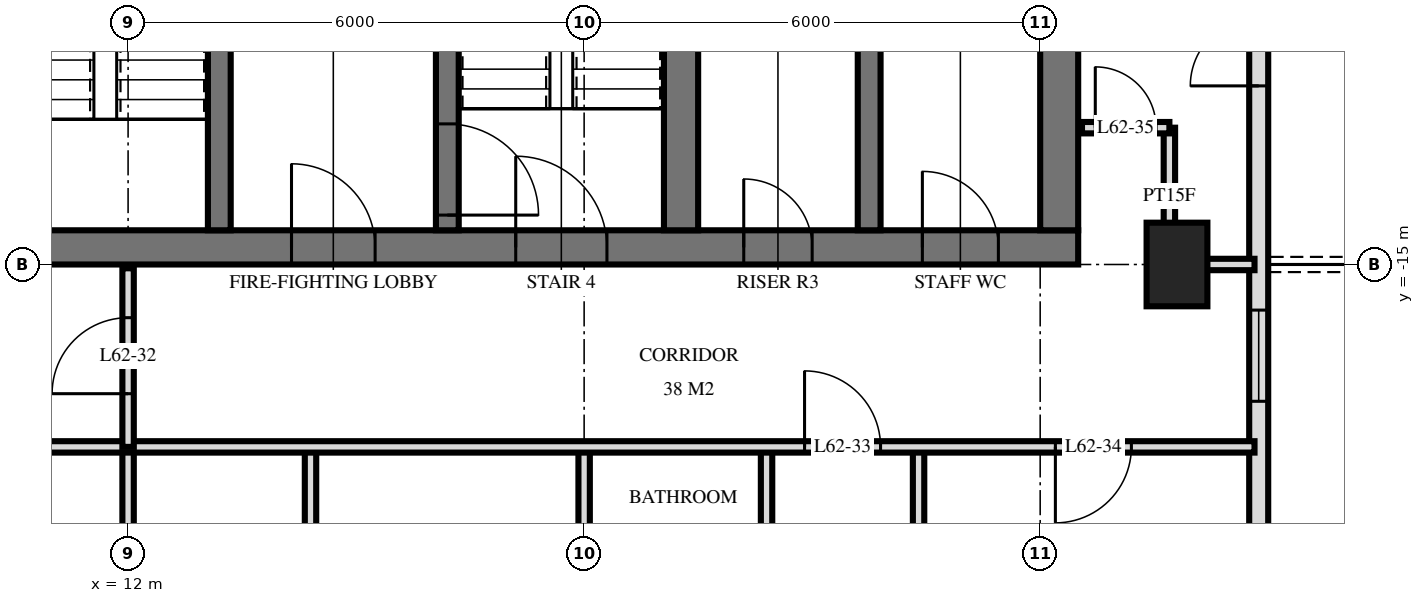
"""IFC4 building model, lengths in metres.
Left out: names, types, materials, properties, quantities, classifications, styles, units other than length and angle.
Written with IfcOpenShell. Run it as: python <this file> out.ifc"""

import sys

from ifc_helpers import new_model, si_unit, direction, frame, frame_2d, origin, origin_2d, place, context, subcontext, project, spatial, rectangle, extrude, element, fill, save


model = new_model("IFC4")
c1 = context("Model", 3, precision=1e-05, world=origin(), true_north=direction((0.0, 1.0)))
c2 = subcontext(c1, "Body", "Model", "MODEL_VIEW")
j1 = project(units=[si_unit("LENGTHUNIT", "METRE"), si_unit("PLANEANGLEUNIT", "RADIAN")], contexts=[c1])
p1 = place(None, origin())
s1 = spatial("IfcSite", under=j1, at=p1, CompositionType="ELEMENT")
p2 = place(p1, origin())
s2 = spatial("IfcBuilding", under=s1, at=p2, CompositionType="ELEMENT")
p3 = place(p2, frame((0.0, 0.0, 236.1)))
s3 = spatial("IfcBuildingStorey", under=s2, at=p3, CompositionType="ELEMENT", Elevation=236.1)
p4 = place(p3, frame((25.8, -15.0, 0.0), z_axis=(0.0, 0.0, 1.0), x_axis=(0.0, 1.0, 0.0)))
e1 = element("IfcColumn", 1, at=p4, inside=s3, PredefinedType="COLUMN", context=c2, shape_type="SweptSolid", body=[
    extrude(rectangle(XDim=1.1, YDim=0.8, at=origin_2d()), origin(), (0.0, 0.0, 1.0), 3.5),
])
p5 = place(p3, frame((10.0, -14.775, 0.0), z_axis=(0.0, 0.0, 1.0), x_axis=(1.0, 0.0, 0.0)))
e2 = element("IfcWall", 2, at=p5, inside=s3, PredefinedType="SHEAR", context=c2, shape_type="SweptSolid", body=[
    extrude(rectangle(XDim=14.5, YDim=0.45, at=frame_2d((7.25, 0.0))), origin(), (0.0, 0.0, 1.0), 3.5),
])
p6 = place(p5, frame((7.1, 0.0, 0.0)))
e3 = element("IfcOpeningElement", 3, at=p6, cuts=e2, PredefinedType="OPENING", context=c2, shape_type="SweptSolid", body=[
    extrude(rectangle(XDim=1.2, YDim=2.1, at=frame_2d((0.6, 1.05))), frame((0.0, 0.235, 0.0), z_axis=(0.0, -1.0, 0.0), x_axis=(1.0, 0.0, 0.0)), (0.0, 0.0, 1.0), 0.47),
])
p7 = place(p5, frame((4.15, 0.0, 0.0)))
e4 = element("IfcOpeningElement", 4, at=p7, cuts=e2, PredefinedType="OPENING", context=c2, shape_type="SweptSolid", body=[
    extrude(rectangle(XDim=1.1, YDim=2.1, at=frame_2d((0.55, 1.05))), frame((0.0, 0.235, 0.0), z_axis=(0.0, -1.0, 0.0), x_axis=(1.0, 0.0, 0.0)), (0.0, 0.0, 1.0), 0.47),
])
p8 = place(p5, frame((10.1, 0.0, 0.0)))
e5 = element("IfcOpeningElement", 5, at=p8, cuts=e2, PredefinedType="OPENING", context=c2, shape_type="SweptSolid", body=[
    extrude(rectangle(XDim=0.9, YDim=2.1, at=frame_2d((0.45, 1.05))), frame((0.0, 0.235, 0.0), z_axis=(0.0, -1.0, 0.0), x_axis=(1.0, 0.0, 0.0)), (0.0, 0.0, 1.0), 0.47),
])
p9 = place(p5, frame((12.45, 0.0, 0.0)))
e6 = element("IfcOpeningElement", 6, at=p9, cuts=e2, PredefinedType="OPENING", context=c2, shape_type="SweptSolid", body=[
    extrude(rectangle(XDim=1.0, YDim=2.1, at=frame_2d((0.5, 1.05))), frame((0.0, 0.235, 0.0), z_axis=(0.0, -1.0, 0.0), x_axis=(1.0, 0.0, 0.0)), (0.0, 0.0, 1.0), 0.47),
])
p10 = place(p3, frame((24.25, -14.55, 0.0), z_axis=(0.0, 0.0, 1.0), x_axis=(0.0, 1.0, 0.0)))
e7 = element("IfcWall", 7, at=p10, inside=s3, PredefinedType="SHEAR", context=c2, shape_type="SweptSolid", body=[
    extrude(rectangle(XDim=14.1, YDim=0.5, at=frame_2d((7.05, 0.0))), origin(), (0.0, 0.0, 1.0), 3.5),
])
p11 = place(p3, frame((13.2, -14.55, 0.0), z_axis=(0.0, 0.0, 1.0), x_axis=(0.0, 1.0, 0.0)))
e8 = element("IfcWall", 8, at=p11, inside=s3, PredefinedType="SHEAR", context=c2, shape_type="SweptSolid", body=[
    extrude(rectangle(XDim=5.4, YDim=0.3, at=frame_2d((2.7, 0.0))), origin(), (0.0, 0.0, 1.0), 3.5),
])
p12 = place(p11, frame((4.0, 0.0, 0.0)))
e9 = element("IfcOpeningElement", 9, at=p12, cuts=e8, PredefinedType="OPENING", context=c2, shape_type="SweptSolid", body=[
    extrude(rectangle(XDim=1.2, YDim=2.1, at=frame_2d((0.6, 1.05))), frame((0.0, 0.16, 0.0), z_axis=(0.0, -1.0, 0.0), x_axis=(1.0, 0.0, 0.0)), (0.0, 0.0, 1.0), 0.32),
])
p13 = place(p3, frame((16.2, -14.55, 0.0), z_axis=(0.0, 0.0, 1.0), x_axis=(0.0, 1.0, 0.0)))
e10 = element("IfcWall", 10, at=p13, inside=s3, PredefinedType="SHEAR", context=c2, shape_type="SweptSolid", body=[
    extrude(rectangle(XDim=5.4, YDim=0.3, at=frame_2d((2.7, 0.0))), origin(), (0.0, 0.0, 1.0), 3.5),
])
p14 = place(p13, frame((0.2, 0.0, 0.0)))
e11 = element("IfcOpeningElement", 11, at=p14, cuts=e10, PredefinedType="OPENING", context=c2, shape_type="SweptSolid", body=[
    extrude(rectangle(XDim=1.2, YDim=2.1, at=frame_2d((0.6, 1.05))), frame((0.0, 0.16, 0.0), z_axis=(0.0, -1.0, 0.0), x_axis=(1.0, 0.0, 0.0)), (0.0, 0.0, 1.0), 0.32),
])
p15 = place(p3, frame((19.275, -14.55, 0.0), z_axis=(0.0, 0.0, 1.0), x_axis=(0.0, 1.0, 0.0)))
e12 = element("IfcWall", 12, at=p15, inside=s3, PredefinedType="SHEAR", context=c2, shape_type="SweptSolid", body=[
    extrude(rectangle(XDim=5.4, YDim=0.45, at=frame_2d((2.7, 0.0))), origin(), (0.0, 0.0, 1.0), 3.5),
])
p16 = place(p3, frame((21.75, -14.55, 0.0), z_axis=(0.0, 0.0, 1.0), x_axis=(0.0, 1.0, 0.0)))
e13 = element("IfcWall", 13, at=p16, inside=s3, PredefinedType="SHEAR", context=c2, shape_type="SweptSolid", body=[
    extrude(rectangle(XDim=5.4, YDim=0.3, at=frame_2d((2.7, 0.0))), origin(), (0.0, 0.0, 1.0), 3.5),
])
p17 = place(p3, frame((26.875, -24.875, 0.0), z_axis=(0.0, 0.0, 1.0), x_axis=(0.0, 1.0, 0.0)))
e14 = element("IfcWall", 14, at=p17, inside=s3, PredefinedType="SOLIDWALL", context=c2, shape_type="SweptSolid", body=[
    extrude(rectangle(XDim=21.551, YDim=0.25, at=frame_2d((10.775, 0.0))), origin(), (0.0, 0.0, 1.0), 3.22),
])
p18 = place(p17, frame((0.575, 0.0, 0.0)))
e15 = element("IfcOpeningElement", 15, at=p18, cuts=e14, PredefinedType="OPENING", context=c2, shape_type="SweptSolid", body=[
    extrude(rectangle(XDim=1.8, YDim=2.4, at=frame_2d((0.9, 1.2))), frame((0.0, 0.135, 0.0), z_axis=(0.0, -1.0, 0.0), x_axis=(1.0, 0.0, 0.0)), (0.0, 0.0, 1.0), 0.27),
])
p19 = place(p17, frame((4.475, 0.0, 0.0)))
e16 = element("IfcOpeningElement", 16, at=p19, cuts=e14, PredefinedType="OPENING", context=c2, shape_type="SweptSolid", body=[
    extrude(rectangle(XDim=1.8, YDim=2.4, at=frame_2d((0.9, 1.2))), frame((0.0, 0.135, 0.0), z_axis=(0.0, -1.0, 0.0), x_axis=(1.0, 0.0, 0.0)), (0.0, 0.0, 1.0), 0.27),
])
p20 = place(p17, frame((8.075, 0.0, 0.9)))
e17 = element("IfcOpeningElement", 17, at=p20, cuts=e14, PredefinedType="OPENING", context=c2, shape_type="SweptSolid", body=[
    extrude(rectangle(XDim=1.2, YDim=1.5, at=frame_2d((0.6, 0.75))), frame((0.0, 0.135, 0.0), z_axis=(0.0, -1.0, 0.0), x_axis=(1.0, 0.0, 0.0)), (0.0, 0.0, 1.0), 0.27),
])
p21 = place(p17, frame((12.225, 0.0, 0.0)))
e18 = element("IfcOpeningElement", 18, at=p21, cuts=e14, PredefinedType="OPENING", context=c2, shape_type="SweptSolid", body=[
    extrude(rectangle(XDim=1.8, YDim=2.4, at=frame_2d((0.9, 1.2))), frame((0.0, 0.135, 0.0), z_axis=(0.0, -1.0, 0.0), x_axis=(1.0, 0.0, 0.0)), (0.0, 0.0, 1.0), 0.27),
])
p22 = place(p3, frame((25.7, -15.0, 0.0), z_axis=(0.0, 0.0, 1.0), x_axis=(0.0, 1.0, 0.0)))
e19 = element("IfcWall", 19, at=p22, inside=s3, PredefinedType="PARTITIONING", context=c2, shape_type="SweptSolid", body=[
    extrude(rectangle(XDim=1.8, YDim=0.15, at=frame_2d((0.9, 0.0))), origin(), (0.0, 0.0, 1.0), 3.22),
])
p23 = place(p3, frame((22.4, -21.6, 0.0), z_axis=(0.0, 0.0, 1.0), x_axis=(0.0, 1.0, 0.0)))
e20 = element("IfcWall", 20, at=p23, inside=s3, PredefinedType="PARTITIONING", context=c2, shape_type="SweptSolid", body=[
    extrude(rectangle(XDim=4.2, YDim=0.15, at=frame_2d((2.1, 0.0))), origin(), (0.0, 0.0, 1.0), 3.22),
])
p24 = place(p3, frame((20.4, -21.6, 0.0), z_axis=(0.0, 0.0, 1.0), x_axis=(0.0, 1.0, 0.0)))
e21 = element("IfcWall", 21, at=p24, inside=s3, PredefinedType="PARTITIONING", context=c2, shape_type="SweptSolid", body=[
    extrude(rectangle(XDim=4.2, YDim=0.15, at=frame_2d((2.1, 0.0))), origin(), (0.0, 0.0, 1.0), 3.22),
])
p25 = place(p24, frame((1.6, 0.0, 0.0)))
e22 = element("IfcOpeningElement", 22, at=p25, cuts=e21, PredefinedType="OPENING", context=c2, shape_type="SweptSolid", body=[
    extrude(rectangle(XDim=1.0, YDim=2.1, at=frame_2d((0.5, 1.05))), frame((0.0, 0.085, 0.0), z_axis=(0.0, -1.0, 0.0), x_axis=(1.0, 0.0, 0.0)), (0.0, 0.0, 1.0), 0.17),
])
for number, where, z_axis, x_axis in (
    (23, (18.0, -21.6, 0.0), (0.0, 0.0, 1.0), (0.0, 1.0, 0.0)),
    (24, (14.4, -21.6, 0.0), (0.0, 0.0, 1.0), (0.0, 1.0, 0.0)),
):
    element("IfcWall", number, at=place(p3, frame(where, z_axis=z_axis, x_axis=x_axis)), inside=s3, PredefinedType="PARTITIONING", context=c2, shape_type="SweptSolid", body=[
        extrude(rectangle(XDim=4.2, YDim=0.15, at=frame_2d((2.1, 0.0))), origin(), (0.0, 0.0, 1.0), 3.22),
    ])
p26 = place(p3, frame((12.0, -17.4, 0.0), z_axis=(0.0, 0.0, 1.0), x_axis=(0.0, 1.0, 0.0)))
e25 = element("IfcWall", 25, at=p26, inside=s3, PredefinedType="PARTITIONING", context=c2, shape_type="SweptSolid", body=[
    extrude(rectangle(XDim=2.35, YDim=0.15, at=frame_2d((1.175, 0.0))), origin(), (0.0, 0.0, 1.0), 3.22),
])
p27 = place(p26, frame((0.7, 0.0, 0.0)))
e26 = element("IfcOpeningElement", 26, at=p27, cuts=e25, PredefinedType="OPENING", context=c2, shape_type="SweptSolid", body=[
    extrude(rectangle(XDim=1.0, YDim=2.1, at=frame_2d((0.5, 1.05))), frame((0.0, 0.085, 0.0), z_axis=(0.0, -1.0, 0.0), x_axis=(1.0, 0.0, 0.0)), (0.0, 0.0, 1.0), 0.17),
])
p28 = place(p3, frame((12.0, -29.22, 0.0), z_axis=(0.0, 0.0, 1.0), x_axis=(0.0, 1.0, 0.0)))
e27 = element("IfcWall", 27, at=p28, inside=s3, PredefinedType="PARTITIONING", context=c2, shape_type="SweptSolid", body=[
    extrude(rectangle(XDim=11.82, YDim=0.15, at=frame_2d((5.91, 0.0))), origin(), (0.0, 0.0, 1.0), 3.22),
])
p29 = place(p3, frame((-26.82, -17.4, 0.0), z_axis=(0.0, 0.0, 1.0), x_axis=(1.0, 0.0, 0.0)))
e28 = element("IfcWall", 28, at=p29, inside=s3, PredefinedType="PARTITIONING", context=c2, shape_type="SweptSolid", body=[
    extrude(rectangle(XDim=53.64, YDim=0.15, at=frame_2d((26.82, 0.0))), origin(), (0.0, 0.0, 1.0), 3.22),
])
p30 = place(p29, frame((11.97, 0.0, 0.0)))
e29 = element("IfcOpeningElement", 29, at=p30, cuts=e28, PredefinedType="OPENING", context=c2, shape_type="SweptSolid", body=[
    extrude(rectangle(XDim=1.0, YDim=2.1, at=frame_2d((0.5, 1.05))), frame((0.0, 0.085, 0.0), z_axis=(0.0, -1.0, 0.0), x_axis=(1.0, 0.0, 0.0)), (0.0, 0.0, 1.0), 0.17),
])
p31 = place(p29, frame((3.92, 0.0, 0.0)))
e30 = element("IfcOpeningElement", 30, at=p31, cuts=e28, PredefinedType="OPENING", context=c2, shape_type="SweptSolid", body=[
    extrude(rectangle(XDim=1.0, YDim=2.1, at=frame_2d((0.5, 1.05))), frame((0.0, 0.085, 0.0), z_axis=(0.0, -1.0, 0.0), x_axis=(1.0, 0.0, 0.0)), (0.0, 0.0, 1.0), 0.17),
])
p32 = place(p29, frame((5.72, 0.0, 0.0)))
e31 = element("IfcOpeningElement", 31, at=p32, cuts=e28, PredefinedType="OPENING", context=c2, shape_type="SweptSolid", body=[
    extrude(rectangle(XDim=1.0, YDim=2.1, at=frame_2d((0.5, 1.05))), frame((0.0, 0.085, 0.0), z_axis=(0.0, -1.0, 0.0), x_axis=(1.0, 0.0, 0.0)), (0.0, 0.0, 1.0), 0.17),
])
p33 = place(p29, frame((47.72, 0.0, 0.0)))
e32 = element("IfcOpeningElement", 32, at=p33, cuts=e28, PredefinedType="OPENING", context=c2, shape_type="SweptSolid", body=[
    extrude(rectangle(XDim=1.0, YDim=2.1, at=frame_2d((0.5, 1.05))), frame((0.0, 0.085, 0.0), z_axis=(0.0, -1.0, 0.0), x_axis=(1.0, 0.0, 0.0)), (0.0, 0.0, 1.0), 0.17),
])
p34 = place(p29, frame((51.02, 0.0, 0.0)))
e33 = element("IfcOpeningElement", 33, at=p34, cuts=e28, PredefinedType="OPENING", context=c2, shape_type="SweptSolid", body=[
    extrude(rectangle(XDim=1.0, YDim=2.1, at=frame_2d((0.5, 1.05))), frame((0.0, 0.085, 0.0), z_axis=(0.0, -1.0, 0.0), x_axis=(1.0, 0.0, 0.0)), (0.0, 0.0, 1.0), 0.17),
])
p35 = place(p29, frame((17.32, 0.0, 0.0)))
e34 = element("IfcOpeningElement", 34, at=p35, cuts=e28, PredefinedType="OPENING", context=c2, shape_type="SweptSolid", body=[
    extrude(rectangle(XDim=1.0, YDim=2.1, at=frame_2d((0.5, 1.05))), frame((0.0, 0.085, 0.0), z_axis=(0.0, -1.0, 0.0), x_axis=(1.0, 0.0, 0.0)), (0.0, 0.0, 1.0), 0.17),
])
p36 = place(p29, frame((23.32, 0.0, 0.0)))
e35 = element("IfcOpeningElement", 35, at=p36, cuts=e28, PredefinedType="OPENING", context=c2, shape_type="SweptSolid", body=[
    extrude(rectangle(XDim=1.0, YDim=2.1, at=frame_2d((0.5, 1.05))), frame((0.0, 0.085, 0.0), z_axis=(0.0, -1.0, 0.0), x_axis=(1.0, 0.0, 0.0)), (0.0, 0.0, 1.0), 0.17),
])
p37 = place(p29, frame((29.32, 0.0, 0.0)))
e36 = element("IfcOpeningElement", 36, at=p37, cuts=e28, PredefinedType="OPENING", context=c2, shape_type="SweptSolid", body=[
    extrude(rectangle(XDim=1.0, YDim=2.1, at=frame_2d((0.5, 1.05))), frame((0.0, 0.085, 0.0), z_axis=(0.0, -1.0, 0.0), x_axis=(1.0, 0.0, 0.0)), (0.0, 0.0, 1.0), 0.17),
])
p38 = place(p29, frame((35.32, 0.0, 0.0)))
e37 = element("IfcOpeningElement", 37, at=p38, cuts=e28, PredefinedType="OPENING", context=c2, shape_type="SweptSolid", body=[
    extrude(rectangle(XDim=1.0, YDim=2.1, at=frame_2d((0.5, 1.05))), frame((0.0, 0.085, 0.0), z_axis=(0.0, -1.0, 0.0), x_axis=(1.0, 0.0, 0.0)), (0.0, 0.0, 1.0), 0.17),
])
p39 = place(p3, frame((25.7, -15.0, 0.0), z_axis=(0.0, 0.0, 1.0), x_axis=(1.0, 0.0, 0.0)))
e38 = element("IfcWall", 38, at=p39, inside=s3, PredefinedType="PARTITIONING", context=c2, shape_type="SweptSolid", body=[
    extrude(rectangle(XDim=1.12, YDim=0.15, at=frame_2d((0.56, 0.0))), origin(), (0.0, 0.0, 1.0), 3.22),
])
p40 = place(p3, frame((24.55, -13.2, 0.0), z_axis=(0.0, 0.0, 1.0), x_axis=(1.0, 0.0, 0.0)))
e39 = element("IfcWall", 39, at=p40, inside=s3, PredefinedType="PARTITIONING", context=c2, shape_type="SweptSolid", body=[
    extrude(rectangle(XDim=1.15, YDim=0.15, at=frame_2d((0.575, 0.0))), origin(), (0.0, 0.0, 1.0), 3.22),
])
p41 = place(p40, frame((0.175, 0.0, 0.0)))
e40 = element("IfcOpeningElement", 40, at=p41, cuts=e39, PredefinedType="OPENING", context=c2, shape_type="SweptSolid", body=[
    extrude(rectangle(XDim=0.8, YDim=2.1, at=frame_2d((0.4, 1.05))), frame((0.0, 0.085, 0.0), z_axis=(0.0, -1.0, 0.0), x_axis=(1.0, 0.0, 0.0)), (0.0, 0.0, 1.0), 0.17),
])
p42 = place(p20, origin())
e41 = element("IfcWindow", 41, at=p42, inside=s3, PartitioningType="SINGLE_PANEL", PredefinedType="WINDOW", context=c2, shape_type="SweptSolid", body=[
    extrude(rectangle(XDim=1.2, YDim=1.5, at=frame_2d((0.6, 0.75))), frame((0.0, 0.03, 0.0), z_axis=(0.0, -1.0, 0.0), x_axis=(1.0, 0.0, 0.0)), (0.0, 0.0, 1.0), 0.06),
])
fill(e17, e41)
p43 = place(p21, origin())
e42 = element("IfcDoor", 42, at=p43, inside=s3, OperationType="DOUBLE_DOOR_SINGLE_SWING", PredefinedType="DOOR", context=c2, shape_type="SweptSolid", body=[
    extrude(rectangle(XDim=1.8, YDim=2.4, at=frame_2d((0.9, 1.2))), frame((0.0, 0.025, 0.0), z_axis=(0.0, -1.0, 0.0), x_axis=(1.0, 0.0, 0.0)), (0.0, 0.0, 1.0), 0.05),
])
fill(e18, e42)
p44 = place(p6, origin())
e43 = element("IfcDoor", 43, at=p44, inside=s3, OperationType="SINGLE_SWING_RIGHT", PredefinedType="DOOR", context=c2, shape_type="SweptSolid", body=[
    extrude(rectangle(XDim=1.2, YDim=2.1, at=frame_2d((0.6, 1.05))), frame((0.0, 0.025, 0.0), z_axis=(0.0, -1.0, 0.0), x_axis=(1.0, 0.0, 0.0)), (0.0, 0.0, 1.0), 0.05),
])
fill(e3, e43)
p45 = place(p7, origin())
e44 = element("IfcDoor", 44, at=p45, inside=s3, OperationType="SINGLE_SWING_RIGHT", PredefinedType="DOOR", context=c2, shape_type="SweptSolid", body=[
    extrude(rectangle(XDim=1.1, YDim=2.1, at=frame_2d((0.55, 1.05))), frame((0.0, 0.025, 0.0), z_axis=(0.0, -1.0, 0.0), x_axis=(1.0, 0.0, 0.0)), (0.0, 0.0, 1.0), 0.05),
])
fill(e4, e44)
p46 = place(p8, origin())
e45 = element("IfcDoor", 45, at=p46, inside=s3, OperationType="SINGLE_SWING_RIGHT", PredefinedType="DOOR", context=c2, shape_type="SweptSolid", body=[
    extrude(rectangle(XDim=0.9, YDim=2.1, at=frame_2d((0.45, 1.05))), frame((0.0, 0.025, 0.0), z_axis=(0.0, -1.0, 0.0), x_axis=(1.0, 0.0, 0.0)), (0.0, 0.0, 1.0), 0.05),
])
fill(e5, e45)
p47 = place(p9, origin())
e46 = element("IfcDoor", 46, at=p47, inside=s3, OperationType="SINGLE_SWING_RIGHT", PredefinedType="DOOR", context=c2, shape_type="SweptSolid", body=[
    extrude(rectangle(XDim=1.0, YDim=2.1, at=frame_2d((0.5, 1.05))), frame((0.0, 0.025, 0.0), z_axis=(0.0, -1.0, 0.0), x_axis=(1.0, 0.0, 0.0)), (0.0, 0.0, 1.0), 0.05),
])
fill(e6, e46)
p48 = place(p14, frame((0.6, 0.0, 0.0), z_axis=(0.0, 0.0, 1.0), x_axis=(-1.0, 0.0, 0.0)))
e47 = element("IfcDoor", 47, at=p48, inside=s3, OperationType="SINGLE_SWING_LEFT", PredefinedType="DOOR", context=c2, shape_type="SweptSolid", body=[
    extrude(rectangle(XDim=1.2, YDim=2.1, at=frame_2d((0.0, 1.05))), frame((0.0, -0.025, 0.0), z_axis=(0.0, 1.0, 0.0), x_axis=(-1.0, 0.0, 0.0)), (0.0, 0.0, 1.0), 0.05),
])
fill(e11, e47)
p49 = place(p27, origin())
e48 = element("IfcDoor", 48, at=p49, inside=s3, OperationType="SINGLE_SWING_RIGHT", PredefinedType="DOOR", context=c2, shape_type="SweptSolid", body=[
    extrude(rectangle(XDim=1.0, YDim=2.1, at=frame_2d((0.5, 1.05))), frame((0.0, 0.025, 0.0), z_axis=(0.0, -1.0, 0.0), x_axis=(1.0, 0.0, 0.0)), (0.0, 0.0, 1.0), 0.05),
])
fill(e26, e48)
p50 = place(p33, origin())
e49 = element("IfcDoor", 49, at=p50, inside=s3, OperationType="SINGLE_SWING_RIGHT", PredefinedType="DOOR", context=c2, shape_type="SweptSolid", body=[
    extrude(rectangle(XDim=1.0, YDim=2.1, at=frame_2d((0.5, 1.05))), frame((0.0, 0.025, 0.0), z_axis=(0.0, -1.0, 0.0), x_axis=(1.0, 0.0, 0.0)), (0.0, 0.0, 1.0), 0.05),
])
fill(e32, e49)
p51 = place(p34, frame((0.5, 0.0, 0.0), z_axis=(0.0, 0.0, 1.0), x_axis=(-1.0, 0.0, 0.0)))
e50 = element("IfcDoor", 50, at=p51, inside=s3, OperationType="SINGLE_SWING_LEFT", PredefinedType="DOOR", context=c2, shape_type="SweptSolid", body=[
    extrude(rectangle(XDim=1.0, YDim=2.1, at=frame_2d((0.0, 1.05))), frame((0.0, -0.025, 0.0), z_axis=(0.0, 1.0, 0.0), x_axis=(-1.0, 0.0, 0.0)), (0.0, 0.0, 1.0), 0.05),
])
fill(e33, e50)
p52 = place(p41, origin())
e51 = element("IfcDoor", 51, at=p52, inside=s3, OperationType="SINGLE_SWING_RIGHT", PredefinedType="DOOR", context=c2, shape_type="SweptSolid", body=[
    extrude(rectangle(XDim=0.8, YDim=2.1, at=frame_2d((0.4, 1.05))), frame((0.0, 0.025, 0.0), z_axis=(0.0, -1.0, 0.0), x_axis=(1.0, 0.0, 0.0)), (0.0, 0.0, 1.0), 0.05),
])
fill(e40, e51)
save(model, sys.argv[1])
